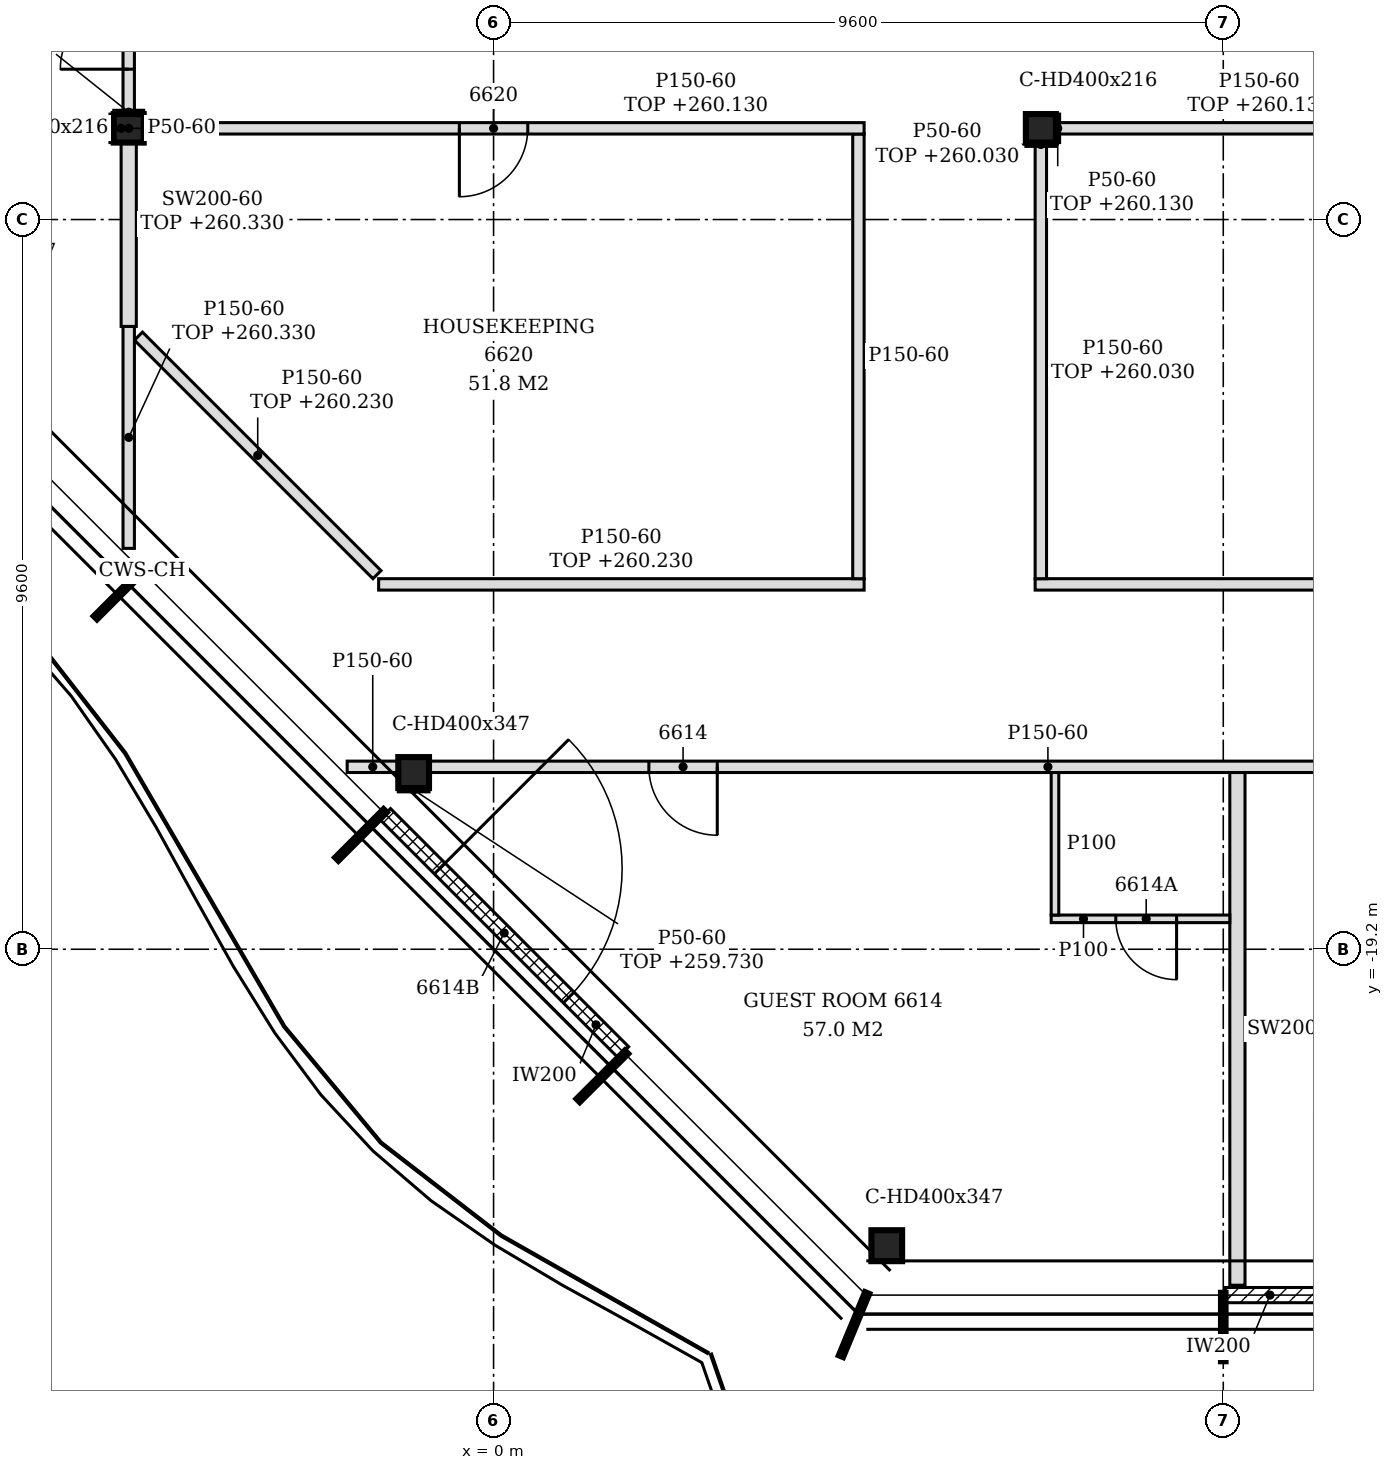
"""IFC4 building model, lengths in metres.
Left out: names, types, materials, properties, quantities, classifications, styles, units other than length and angle.
Written with IfcOpenShell. Run it as: python <this file> out.ifc"""

import sys

from ifc_helpers import new_model, si_unit, direction, frame, frame_2d, origin, origin_2d, place, context, subcontext, project, spatial, polyline, rectangle, i_section, outline, extrude, clip, halfspace, element, fill, save


model = new_model("IFC4")
c1 = context("Model", 3, precision=1e-05, world=origin(), true_north=direction((0.0, 1.0)))
c2 = subcontext(c1, "Body", "Model", "MODEL_VIEW")
j1 = project(units=[si_unit("LENGTHUNIT", "METRE"), si_unit("PLANEANGLEUNIT", "RADIAN")], contexts=[c1])
p1 = place(None, origin())
s1 = spatial("IfcSite", under=j1, at=p1, CompositionType="ELEMENT")
p2 = place(p1, origin())
s2 = spatial("IfcBuilding", under=s1, at=p2, CompositionType="ELEMENT")
p3 = place(p2, frame((0.0, 0.0, 257.4)))
s3 = spatial("IfcBuildingStorey", under=s2, at=p3, CompositionType="ELEMENT", Elevation=257.4)
for number, where, z_axis, x_axis in (
    (1, (5.173, -23.1, -0.15), (0.0, 0.0, 1.0), (1.0, 0.0, 0.0)),
    (2, (-1.052, -16.876, -0.15), (0.0, 0.0, 1.0), (1.0, 0.0, 0.0)),
):
    element("IfcColumn", number, at=place(p3, frame(where, z_axis=z_axis, x_axis=x_axis)), inside=s3, PredefinedType="COLUMN", context=c2, shape_type="Clipping", body=[
        clip(extrude(i_section(OverallWidth=0.404, OverallDepth=0.407, WebThickness=0.027, FlangeThickness=0.044, FilletRadius=0.015, at=origin_2d()), origin(), (0.0, 0.0, 1.0), 3.5), halfspace(frame((0.0, 0.0, 3.05), z_axis=(0.0, 0.0, 1.0), x_axis=(1.0, 0.0, 0.0)), False)),
    ])
for number, where, z_axis, x_axis in (
    (3, (-4.8, -8.4, -0.15), (0.0, 0.0, 1.0), (1.0, 0.0, 0.0)),
    (4, (7.2, -8.4, -0.15), (0.0, 0.0, 1.0), (1.0, 0.0, 0.0)),
):
    element("IfcColumn", number, at=place(p3, frame(where, z_axis=z_axis, x_axis=x_axis)), inside=s3, PredefinedType="COLUMN", context=c2, shape_type="SweptSolid", body=[
        extrude(i_section(OverallWidth=0.394, OverallDepth=0.375, WebThickness=0.017, FlangeThickness=0.028, FilletRadius=0.015, at=origin_2d()), origin(), (0.0, 0.0, 1.0), 3.5),
    ])
p4 = place(p3, frame((9.63, -23.75, 0.0), z_axis=(0.0, 0.0, 1.0), x_axis=(1.0, 0.0, 0.0)))
e5 = element("IfcWall", 5, at=p4, inside=s3, PredefinedType="NOTDEFINED", context=c2, shape_type="SweptSolid", body=[
    extrude(rectangle(XDim=4.74, YDim=0.2, at=frame_2d((2.37, 0.0))), origin(), (0.0, 0.0, 1.0), 3.35),
])
p5 = place(p4, frame((1.17, 0.0, 0.0)))
e6 = element("IfcOpeningElement", 6, at=p5, cuts=e5, PredefinedType="OPENING", context=c2, shape_type="SweptSolid", body=[
    extrude(rectangle(XDim=2.4, YDim=2.4, at=frame_2d((1.2, 1.2))), frame((0.0, 0.11, 0.0), z_axis=(0.0, -1.0, 0.0), x_axis=(1.0, 0.0, 0.0)), (0.0, 0.0, 1.0), 0.22),
])
p6 = place(p3, frame((-1.427, -17.42, 0.0), z_axis=(0.0, 0.0, 1.0), x_axis=(0.707106781187, -0.707106781187, 0.0)))
e7 = element("IfcWall", 7, at=p6, inside=s3, PredefinedType="NOTDEFINED", context=c2, shape_type="SweptSolid", body=[
    extrude(rectangle(XDim=4.431, YDim=0.2, at=frame_2d((2.216, 0.0))), origin(), (0.0, 0.0, 1.0), 3.35),
])
p7 = place(p6, frame((1.015, 0.0, 0.0)))
e8 = element("IfcOpeningElement", 8, at=p7, cuts=e7, PredefinedType="OPENING", context=c2, shape_type="SweptSolid", body=[
    extrude(rectangle(XDim=2.4, YDim=2.4, at=frame_2d((1.2, 1.2))), frame((0.0, 0.11, 0.0), z_axis=(0.0, -1.0, 0.0), x_axis=(1.0, 0.0, 0.0)), (0.0, 0.0, 1.0), 0.22),
])
p8 = place(p3, frame((9.786, -23.62, 0.0), z_axis=(0.0, 0.0, 1.0), x_axis=(0.0, 1.0, 0.0)))
e9 = element("IfcWall", 9, at=p8, inside=s3, PredefinedType="PARTITIONING", context=c2, shape_type="SweptSolid", body=[
    extrude(outline(polyline([(0.0, 0.0), (6.745, 0.0), (6.745, 3.35), (4.525, 3.35), (4.523, 2.78), (4.315, 2.78), (4.313, 3.35), (1.02, 3.35), (1.018, 2.33), (0.02, 2.33), (0.018, 3.35), (0.0, 3.35), (0.0, 0.0)])), frame((0.0, 0.1, 0.0), z_axis=(0.0, -1.0, 0.0), x_axis=(1.0, 0.0, 0.0)), (0.0, 0.0, 1.0), 0.2),
])
p9 = place(p3, frame((7.336, -18.8, 0.0), z_axis=(0.0, 0.0, 1.0), x_axis=(1.0, 0.0, 0.0)))
e10 = element("IfcWall", 10, at=p9, inside=s3, PredefinedType="PARTITIONING", context=c2, shape_type="SweptSolid", body=[
    extrude(outline(polyline([(0.0, 0.0), (2.35, 0.0), (2.35, 3.35), (0.014, 3.35), (0.012, 2.63), (0.0, 2.63), (0.0, 0.0)])), frame((0.0, 0.05, 0.0), z_axis=(0.0, -1.0, 0.0), x_axis=(1.0, 0.0, 0.0)), (0.0, 0.0, 1.0), 0.1),
])
p10 = place(p9, frame((0.85, 0.0, 0.0)))
e11 = element("IfcOpeningElement", 11, at=p10, cuts=e10, PredefinedType="OPENING", context=c2, shape_type="SweptSolid", body=[
    extrude(rectangle(XDim=0.8, YDim=2.1, at=frame_2d((0.4, 1.05))), frame((0.0, 0.06, 0.0), z_axis=(0.0, -1.0, 0.0), x_axis=(1.0, 0.0, 0.0)), (0.0, 0.0, 1.0), 0.12),
])
p11 = place(p3, frame((7.386, -18.75, 0.0), z_axis=(0.0, 0.0, 1.0), x_axis=(0.0, 1.0, 0.0)))
e12 = element("IfcWall", 12, at=p11, inside=s3, PredefinedType="PARTITIONING", context=c2, shape_type="SweptSolid", body=[
    extrude(rectangle(XDim=1.875, YDim=0.1, at=frame_2d((0.938, 0.0))), origin(), (0.0, 0.0, 1.0), 3.35),
])
p12 = place(p3, frame((-1.926, -16.8, 0.0), z_axis=(0.0, 0.0, 1.0), x_axis=(1.0, 0.0, 0.0)))
e13 = element("IfcWall", 13, at=p12, inside=s3, PredefinedType="PARTITIONING", context=c2, shape_type="SweptSolid", body=[
    extrude(outline(polyline([(0.0, 0.0), (0.673, 0.0), (0.673, 2.33), (0.017, 2.33), (0.015, 3.35), (0.0, 3.35), (0.0, 0.0)])), frame((0.0, 0.075, 0.0), z_axis=(0.0, -1.0, 0.0), x_axis=(1.0, 0.0, 0.0)), (0.0, 0.0, 1.0), 0.15),
])
p13 = place(p3, frame((-0.85, -16.8, 0.0), z_axis=(0.0, 0.0, 1.0), x_axis=(1.0, 0.0, 0.0)))
e14 = element("IfcWall", 14, at=p13, inside=s3, PredefinedType="PARTITIONING", context=c2, shape_type="SweptSolid", body=[
    extrude(outline(polyline([(0.0, 0.0), (21.974, 0.0), (21.974, 3.35), (20.199, 3.35), (20.198, 2.63), (19.899, 2.63), (19.897, 3.35), (8.199, 3.35), (8.198, 2.63), (7.899, 2.63), (7.897, 3.35), (0.712, 3.35), (0.71, 2.674), (0.504, 2.674), (0.502, 2.33), (0.0, 2.33), (0.0, 0.0)])), frame((0.0, 0.075, 0.0), z_axis=(0.0, -1.0, 0.0), x_axis=(1.0, 0.0, 0.0)), (0.0, 0.0, 1.0), 0.15),
])
p14 = place(p13, frame((2.893, 0.0, 0.0)))
e15 = element("IfcOpeningElement", 15, at=p14, cuts=e14, PredefinedType="OPENING", context=c2, shape_type="SweptSolid", body=[
    extrude(rectangle(XDim=0.9, YDim=2.1, at=frame_2d((0.45, 1.05))), frame((0.0, 0.085, 0.0), z_axis=(0.0, -1.0, 0.0), x_axis=(1.0, 0.0, 0.0)), (0.0, 0.0, 1.0), 0.17),
])
p15 = place(p13, frame((12.492, 0.0, 0.0)))
e16 = element("IfcOpeningElement", 16, at=p15, cuts=e14, PredefinedType="OPENING", context=c2, shape_type="SweptSolid", body=[
    extrude(rectangle(XDim=0.9, YDim=2.1, at=frame_2d((0.45, 1.05))), frame((0.0, 0.085, 0.0), z_axis=(0.0, -1.0, 0.0), x_axis=(1.0, 0.0, 0.0)), (0.0, 0.0, 1.0), 0.17),
])
p16 = place(p3, frame((-1.512, -14.4, 0.0), z_axis=(0.0, 0.0, 1.0), x_axis=(1.0, 0.0, 0.0)))
e17 = element("IfcWall", 17, at=p16, inside=s3, PredefinedType="PARTITIONING", context=c2, shape_type="SweptSolid", body=[
    extrude(rectangle(XDim=6.387, YDim=0.15, at=frame_2d((3.194, 0.0))), origin(), (0.0, 0.0, 1.0), 2.83),
])
p17 = place(p3, frame((7.125, -14.4, 0.0), z_axis=(0.0, 0.0, 1.0), x_axis=(1.0, 0.0, 0.0)))
e18 = element("IfcWall", 18, at=p17, inside=s3, PredefinedType="PARTITIONING", context=c2, shape_type="SweptSolid", body=[
    extrude(outline(polyline([(0.0, 0.0), (13.004, 0.0), (13.004, 2.78), (12.225, 2.78), (12.223, 2.63), (11.925, 2.63), (11.923, 2.78), (0.225, 2.78), (0.223, 2.63), (0.0, 2.63), (0.0, 0.0)])), frame((0.0, 0.075, 0.0), z_axis=(0.0, -1.0, 0.0), x_axis=(1.0, 0.0, 0.0)), (0.0, 0.0, 1.0), 0.15),
])
p18 = place(p3, frame((-1.534, -14.272, 0.0), z_axis=(0.0, 0.0, 1.0), x_axis=(-0.707134287042, 0.707079274261, 0.0)))
e19 = element("IfcWall", 19, at=p18, inside=s3, PredefinedType="PARTITIONING", context=c2, shape_type="SweptSolid", body=[
    extrude(rectangle(XDim=4.438, YDim=0.15, at=frame_2d((2.219, 0.0))), origin(), (0.0, 0.0, 1.0), 2.83),
])
p19 = place(p3, frame((4.8, -14.325, 0.0), z_axis=(0.0, 0.0, 1.0), x_axis=(0.0, 1.0, 0.0)))
e20 = element("IfcWall", 20, at=p19, inside=s3, PredefinedType="PARTITIONING", context=c2, shape_type="SweptSolid", body=[
    extrude(outline(polyline([(0.0, 0.0), (5.85, 0.0), (5.85, 2.73), (5.775, 2.73), (5.773, 3.35), (0.025, 3.35), (0.023, 2.83), (0.0, 2.83), (0.0, 0.0)])), frame((0.0, 0.075, 0.0), z_axis=(0.0, -1.0, 0.0), x_axis=(1.0, 0.0, 0.0)), (0.0, 0.0, 1.0), 0.15),
])
p20 = place(p3, frame((7.2, -14.325, 0.0), z_axis=(0.0, 0.0, 1.0), x_axis=(0.0, 1.0, 0.0)))
e21 = element("IfcWall", 21, at=p20, inside=s3, PredefinedType="PARTITIONING", context=c2, shape_type="SweptSolid", body=[
    extrude(rectangle(XDim=5.738, YDim=0.15, at=frame_2d((2.869, 0.0))), origin(), (0.0, 0.0, 1.0), 2.63),
])
p21 = place(p3, frame((-4.8, -13.926, 0.0), z_axis=(0.0, 0.0, 1.0), x_axis=(0.0, 1.0, 0.0)))
e22 = element("IfcWall", 22, at=p21, inside=s3, PredefinedType="PARTITIONING", context=c2, shape_type="SweptSolid", body=[
    extrude(outline(polyline([(0.0, 0.0), (2.92, 0.0), (2.92, 2.93), (1.581, 2.93), (1.579, 2.33), (0.017, 2.33), (0.015, 2.93), (0.0, 2.93), (0.0, 0.0)])), frame((0.0, 0.075, 0.0), z_axis=(0.0, -1.0, 0.0), x_axis=(1.0, 0.0, 0.0)), (0.0, 0.0, 1.0), 0.15),
])
p22 = place(p3, frame((-4.8, -11.006, 0.0), z_axis=(0.0, 0.0, 1.0), x_axis=(0.0, 1.0, 0.0)))
e23 = element("IfcWall", 23, at=p22, inside=s3, PredefinedType="PARTITIONING", context=c2, shape_type="SweptSolid", body=[
    extrude(rectangle(XDim=2.419, YDim=0.2, at=frame_2d((1.209, 0.0))), origin(), (0.0, 0.0, 1.0), 2.93),
])
p23 = place(p3, frame((-4.603, -8.4, 0.0), z_axis=(0.0, 0.0, 1.0), x_axis=(1.0, 0.0, 0.0)))
e24 = element("IfcWall", 24, at=p23, inside=s3, PredefinedType="PARTITIONING", context=c2, shape_type="SweptSolid", body=[
    extrude(rectangle(XDim=9.478, YDim=0.15, at=frame_2d((4.739, 0.0))), origin(), (0.0, 0.0, 1.0), 2.73),
])
p24 = place(p23, frame((4.153, 0.0, 0.0)))
e25 = element("IfcOpeningElement", 25, at=p24, cuts=e24, PredefinedType="OPENING", context=c2, shape_type="SweptSolid", body=[
    extrude(rectangle(XDim=0.9, YDim=2.1, at=frame_2d((0.45, 1.05))), frame((0.0, 0.085, 0.0), z_axis=(0.0, -1.0, 0.0), x_axis=(1.0, 0.0, 0.0)), (0.0, 0.0, 1.0), 0.17),
])
p25 = place(p3, frame((7.397, -8.4, 0.0), z_axis=(0.0, 0.0, 1.0), x_axis=(1.0, 0.0, 0.0)))
e26 = element("IfcWall", 26, at=p25, inside=s3, PredefinedType="PARTITIONING", context=c2, shape_type="SweptSolid", body=[
    extrude(rectangle(XDim=11.606, YDim=0.15, at=frame_2d((5.803, 0.0))), origin(), (0.0, 0.0, 1.0), 2.73),
])
p26 = place(p25, frame((5.353, 0.0, 0.0)))
e27 = element("IfcOpeningElement", 27, at=p26, cuts=e26, PredefinedType="OPENING", context=c2, shape_type="SweptSolid", body=[
    extrude(rectangle(XDim=0.9, YDim=2.1, at=frame_2d((0.45, 1.05))), frame((0.0, 0.085, 0.0), z_axis=(0.0, -1.0, 0.0), x_axis=(1.0, 0.0, 0.0)), (0.0, 0.0, 1.0), 0.17),
])
p27 = place(p3, frame((-4.8, -8.212, 0.0), z_axis=(0.0, 0.0, 1.0), x_axis=(0.0, 1.0, 0.0)))
e28 = element("IfcWall", 28, at=p27, inside=s3, PredefinedType="PARTITIONING", context=c2, shape_type="SweptSolid", body=[
    extrude(rectangle(XDim=10.425, YDim=0.15, at=frame_2d((5.212, 0.0))), origin(), (0.0, 0.0, 1.0), 2.73),
])
p28 = place(p27, frame((7.163, 0.0, 0.0)))
e29 = element("IfcOpeningElement", 29, at=p28, cuts=e28, PredefinedType="OPENING", context=c2, shape_type="SweptSolid", body=[
    extrude(rectangle(XDim=0.9, YDim=2.1, at=frame_2d((0.45, 1.05))), frame((0.0, 0.085, 0.0), z_axis=(0.0, -1.0, 0.0), x_axis=(1.0, 0.0, 0.0)), (0.0, 0.0, 1.0), 0.17),
])
p29 = place(p27, frame((0.591, 0.0, 0.0)))
e30 = element("IfcOpeningElement", 30, at=p29, cuts=e28, PredefinedType="OPENING", context=c2, shape_type="SweptSolid", body=[
    extrude(rectangle(XDim=0.9, YDim=2.1, at=frame_2d((0.45, 1.05))), frame((0.0, 0.085, 0.0), z_axis=(0.0, -1.0, 0.0), x_axis=(1.0, 0.0, 0.0)), (0.0, 0.0, 1.0), 0.17),
])
p30 = place(p3, frame((-1.253, -17.104, 0.0), z_axis=(0.0, 0.0, 1.0), x_axis=(1.0, 0.0, 0.0)))
e31 = element("IfcWall", 31, at=p30, inside=s3, PredefinedType="PARTITIONING", context=c2, shape_type="SweptSolid", body=[
    extrude(rectangle(XDim=0.404, YDim=0.05, at=frame_2d((0.202, 0.0))), origin(), (0.0, 0.0, 1.0), 2.33),
])
p31 = place(p3, frame((7.422, -8.587, 0.0), z_axis=(0.0, 0.0, 1.0), x_axis=(0.0, 1.0, 0.0)))
e32 = element("IfcWall", 32, at=p31, inside=s3, PredefinedType="PARTITIONING", context=c2, shape_type="SweptSolid", body=[
    extrude(rectangle(XDim=0.375, YDim=0.05, at=frame_2d((0.188, 0.0))), origin(), (0.0, 0.0, 1.0), 2.73),
])
p32 = place(p3, frame((-5.022, -8.587, 0.0), z_axis=(0.0, 0.0, 1.0), x_axis=(0.0, 1.0, 0.0)))
e33 = element("IfcWall", 33, at=p32, inside=s3, PredefinedType="PARTITIONING", context=c2, shape_type="SweptSolid", body=[
    extrude(rectangle(XDim=0.375, YDim=0.05, at=frame_2d((0.188, 0.0))), origin(), (0.0, 0.0, 1.0), 3.35),
])
p33 = place(p3, frame((-4.997, -8.188, 0.0), z_axis=(0.0, 0.0, 1.0), x_axis=(1.0, 0.0, 0.0)))
e34 = element("IfcWall", 34, at=p33, inside=s3, PredefinedType="PARTITIONING", context=c2, shape_type="SweptSolid", body=[
    extrude(rectangle(XDim=0.394, YDim=0.05, at=frame_2d((0.197, 0.0))), origin(), (0.0, 0.0, 1.0), 2.73),
])
p34 = place(p3, frame((7.003, -8.613, 0.0), z_axis=(0.0, 0.0, 1.0), x_axis=(1.0, 0.0, 0.0)))
e35 = element("IfcWall", 35, at=p34, inside=s3, PredefinedType="PARTITIONING", context=c2, shape_type="SweptSolid", body=[
    extrude(rectangle(XDim=0.394, YDim=0.05, at=frame_2d((0.197, 0.0))), origin(), (0.0, 0.0, 1.0), 2.63),
])
p35 = place(p7, origin())
e36 = element("IfcDoor", 36, at=p35, inside=s3, OperationType="SINGLE_SWING_LEFT", PredefinedType="DOOR", context=c2, shape_type="SweptSolid", body=[
    extrude(rectangle(XDim=2.4, YDim=2.4, at=frame_2d((1.2, 1.2))), frame((0.0, 0.025, 0.0), z_axis=(0.0, -1.0, 0.0), x_axis=(1.0, 0.0, 0.0)), (0.0, 0.0, 1.0), 0.05),
])
fill(e8, e36)
p36 = place(p29, origin())
e37 = element("IfcDoor", 37, at=p36, inside=s3, OperationType="SINGLE_SWING_LEFT", PredefinedType="DOOR", context=c2, shape_type="SweptSolid", body=[
    extrude(rectangle(XDim=0.9, YDim=2.1, at=frame_2d((0.45, 1.05))), frame((0.0, 0.025, 0.0), z_axis=(0.0, -1.0, 0.0), x_axis=(1.0, 0.0, 0.0)), (0.0, 0.0, 1.0), 0.05),
])
fill(e30, e37)
p37 = place(p14, frame((0.9, 0.0, 0.0), z_axis=(0.0, 0.0, 1.0), x_axis=(-1.0, 0.0, 0.0)))
e38 = element("IfcDoor", 38, at=p37, inside=s3, OperationType="SINGLE_SWING_LEFT", PredefinedType="DOOR", context=c2, shape_type="SweptSolid", body=[
    extrude(rectangle(XDim=0.9, YDim=2.1, at=frame_2d((0.45, 1.05))), frame((0.0, 0.025, 0.0), z_axis=(0.0, -1.0, 0.0), x_axis=(1.0, 0.0, 0.0)), (0.0, 0.0, 1.0), 0.05),
])
fill(e15, e38)
p38 = place(p10, frame((0.8, 0.0, 0.0), z_axis=(0.0, 0.0, 1.0), x_axis=(-1.0, 0.0, 0.0)))
e39 = element("IfcDoor", 39, at=p38, inside=s3, OperationType="SINGLE_SWING_LEFT", PredefinedType="DOOR", context=c2, shape_type="SweptSolid", body=[
    extrude(rectangle(XDim=0.8, YDim=2.1, at=frame_2d((0.4, 1.05))), frame((0.0, 0.025, 0.0), z_axis=(0.0, -1.0, 0.0), x_axis=(1.0, 0.0, 0.0)), (0.0, 0.0, 1.0), 0.05),
])
fill(e11, e39)
p39 = place(p24, frame((0.9, 0.0, 0.0), z_axis=(0.0, 0.0, 1.0), x_axis=(-1.0, 0.0, 0.0)))
e40 = element("IfcDoor", 40, at=p39, inside=s3, OperationType="SINGLE_SWING_RIGHT", PredefinedType="DOOR", context=c2, shape_type="SweptSolid", body=[
    extrude(rectangle(XDim=0.9, YDim=2.1, at=frame_2d((0.45, 1.05))), frame((0.0, 0.025, 0.0), z_axis=(0.0, -1.0, 0.0), x_axis=(1.0, 0.0, 0.0)), (0.0, 0.0, 1.0), 0.05),
])
fill(e25, e40)
save(model, sys.argv[1])
